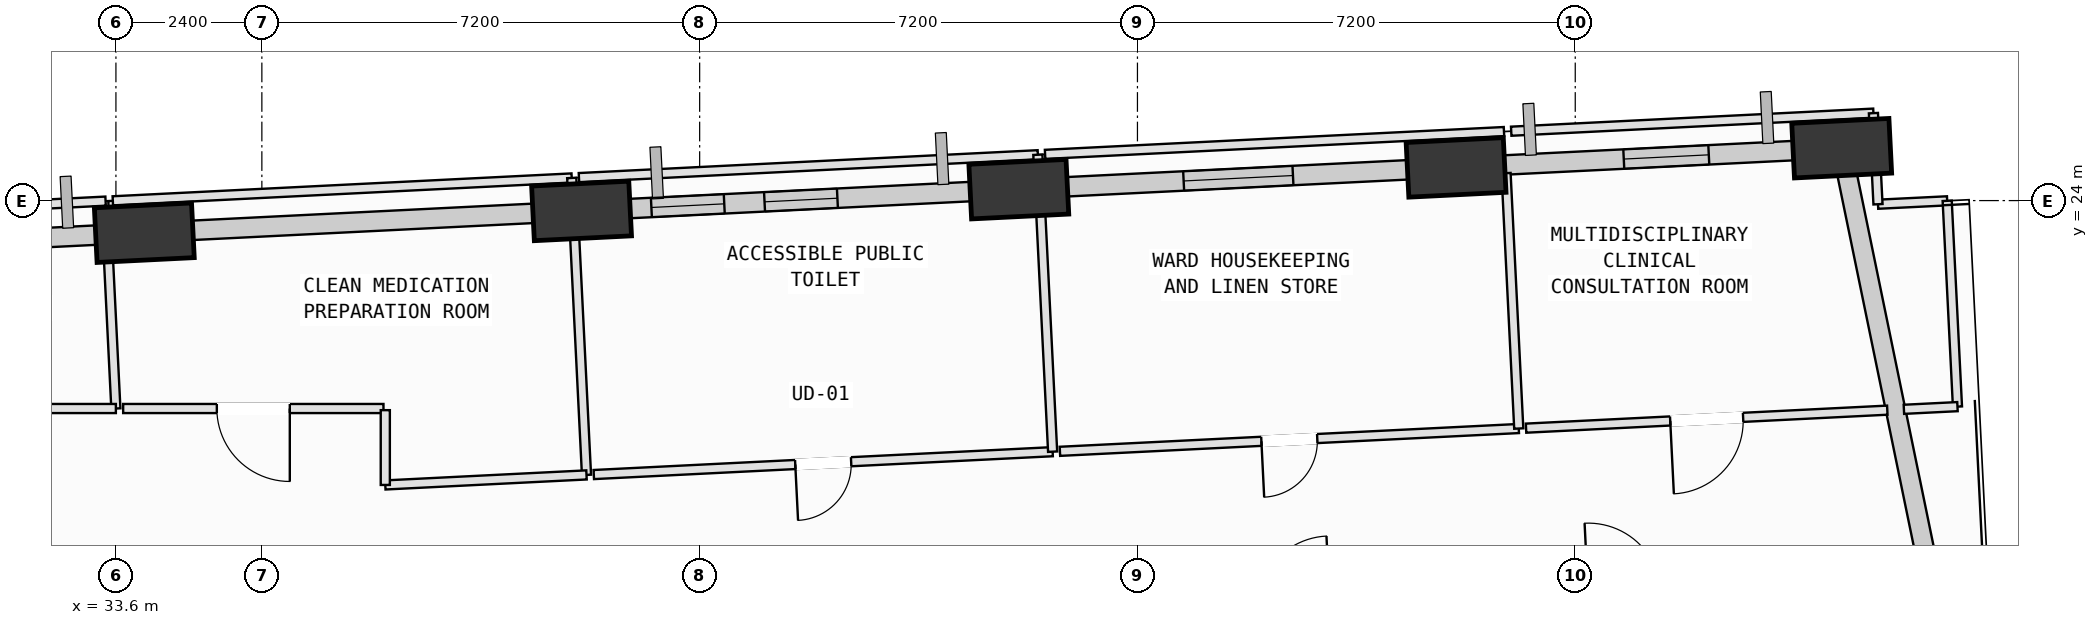
"""IFC4 building model, lengths in metres.
Left out: names, types, materials, properties, quantities, classifications, styles, units other than length and angle.
Written with IfcOpenShell. Run it as: python <this file> out.ifc"""

import sys

from ifc_helpers import new_model, si_unit, direction, frame, frame_2d, origin, origin_2d, place, context, subcontext, project, spatial, rectangle, extrude, element, fill, save


model = new_model("IFC4")
c1 = context("Model", 3, precision=1e-05, world=origin(), true_north=direction((0.0, 1.0)))
c2 = subcontext(c1, "Body", "Model", "MODEL_VIEW")
j1 = project(units=[si_unit("LENGTHUNIT", "METRE"), si_unit("PLANEANGLEUNIT", "RADIAN")], contexts=[c1])
p1 = place(None, origin())
s1 = spatial("IfcSite", under=j1, at=p1, CompositionType="ELEMENT")
p2 = place(p1, origin())
s2 = spatial("IfcBuilding", under=s1, at=p2, CompositionType="ELEMENT")
p3 = place(p2, frame((0.0, 0.0, 35.0)))
s3 = spatial("IfcBuildingStorey", under=s2, at=p3, CompositionType="ELEMENT", Elevation=35.0)
p4 = place(p3, frame((61.982, 24.862, 0.002), z_axis=(-0.001274054745, 0.116788351669, 0.993156008741), x_axis=(-0.998165031682, -0.060273092584, 0.00580722282)))
e1 = element("IfcColumn", 1, at=p4, inside=s3, PredefinedType="COLUMN", context=c2, shape_type="SweptSolid", body=[
    extrude(rectangle(XDim=1.6, YDim=0.9, at=origin_2d()), origin(), (0.0, 0.0, 1.0), 4.024),
])
p5 = place(p3, frame((55.64, 24.546, 0.002), z_axis=(0.000304169263, 0.091007443375, 0.995850165804), x_axis=(-0.998923039729, -0.046176668444, 0.00452504039)))
e2 = element("IfcColumn", 2, at=p5, inside=s3, PredefinedType="COLUMN", context=c2, shape_type="SweptSolid", body=[
    extrude(rectangle(XDim=1.6, YDim=0.9, at=origin_2d()), origin(), (0.0, 0.0, 1.0), 4.013),
])
p6 = place(p3, frame((48.449, 24.188, 0.002), z_axis=(0.002073047008, 0.061398774634, 0.998111162621), x_axis=(-0.999868976749, -0.01589650689, 0.003054571023)))
e3 = element("IfcColumn", 3, at=p6, inside=s3, PredefinedType="COLUMN", context=c2, shape_type="SweptSolid", body=[
    extrude(rectangle(XDim=1.6, YDim=0.9, at=origin_2d()), origin(), (0.0, 0.0, 1.0), 4.004),
])
p7 = place(p3, frame((41.258, 23.83, 0.002), z_axis=(0.003724424228, 0.031749190144, 0.999488928197), x_axis=(-0.997751228321, 0.067007164318, 0.001589437965)))
e4 = element("IfcColumn", 4, at=p7, inside=s3, PredefinedType="COLUMN", context=c2, shape_type="SweptSolid", body=[
    extrude(rectangle(XDim=1.6, YDim=0.9, at=origin_2d()), origin(), (0.0, 0.0, 1.0), 3.999),
])
p8 = place(p3, frame((34.067, 23.472, 0.002), z_axis=(0.00549776835, 0.00195476208, 0.999982976579), x_axis=(-0.381442714794, 0.924392433526, 0.000290121348)))
e5 = element("IfcColumn", 5, at=p8, inside=s3, PredefinedType="COLUMN", context=c2, shape_type="SweptSolid", body=[
    extrude(rectangle(XDim=1.6, YDim=0.9, at=origin_2d()), origin(), (0.0, 0.0, 1.0), 3.997),
])
p9 = place(p3, frame((62.058, 24.494, 0.0), z_axis=(0.0, 0.0, 1.0), x_axis=(0.201776077259, -0.979431679417, 0.0)))
e6 = element("IfcWall", 6, at=p9, inside=s3, PredefinedType="SOLIDWALL", context=c2, shape_type="SweptSolid", body=[
    extrude(rectangle(XDim=8.614, YDim=0.32, at=frame_2d((4.307, 0.0))), origin(), (0.0, 0.0, 1.0), 3.165),
])
p10 = place(p3, frame((56.229, 24.575, 0.0), z_axis=(0.0, 0.0, 1.0), x_axis=(0.998762835783, 0.049727234574, 0.0)))
e7 = element("IfcWall", 7, at=p10, inside=s3, PredefinedType="SOLIDWALL", context=c2, shape_type="SweptSolid", body=[
    extrude(rectangle(XDim=5.209, YDim=0.32, at=frame_2d((2.604, 0.0))), origin(), (0.0, 0.0, 1.0), 3.165),
])
p11 = place(p10, frame((2.172, 0.0, 0.75)))
e8 = element("IfcOpeningElement", 8, at=p11, cuts=e7, PredefinedType="OPENING", context=c2, shape_type="SweptSolid", body=[
    extrude(rectangle(XDim=1.4, YDim=1.85, at=frame_2d((0.7, 0.925))), frame((0.0, 0.17, 0.0), z_axis=(0.0, -1.0, 0.0), x_axis=(1.0, 0.0, 0.0)), (0.0, 0.0, 1.0), 0.34),
])
p12 = place(p3, frame((49.054, 24.218, 0.0), z_axis=(0.0, 0.0, 1.0), x_axis=(0.998764939735, 0.049684959063, 0.0)))
e9 = element("IfcWall", 9, at=p12, inside=s3, PredefinedType="SOLIDWALL", context=c2, shape_type="SweptSolid", body=[
    extrude(rectangle(XDim=6.024, YDim=0.32, at=frame_2d((3.012, 0.0))), origin(), (0.0, 0.0, 1.0), 3.165),
])
p13 = place(p12, frame((2.109, 0.0, 0.75)))
e10 = element("IfcOpeningElement", 10, at=p13, cuts=e9, PredefinedType="OPENING", context=c2, shape_type="SweptSolid", body=[
    extrude(rectangle(XDim=1.8, YDim=2.05, at=frame_2d((0.9, 1.025))), frame((0.0, 0.17, 0.0), z_axis=(0.0, -1.0, 0.0), x_axis=(1.0, 0.0, 0.0)), (0.0, 0.0, 1.0), 0.34),
])
p14 = place(p3, frame((41.872, 23.86, 0.0), z_axis=(0.0, 0.0, 1.0), x_axis=(0.998762870305, 0.049726541212, 0.0)))
e11 = element("IfcWall", 11, at=p14, inside=s3, PredefinedType="SOLIDWALL", context=c2, shape_type="SweptSolid", body=[
    extrude(rectangle(XDim=6.0, YDim=0.32, at=frame_2d((3.0, 0.0))), origin(), (0.0, 0.0, 1.0), 3.165),
])
p15 = place(p14, frame((2.398, 0.0, 0.75)))
e12 = element("IfcOpeningElement", 12, at=p15, cuts=e11, PredefinedType="OPENING", context=c2, shape_type="SweptSolid", body=[
    extrude(rectangle(XDim=1.2, YDim=1.75, at=frame_2d((0.6, 0.875))), frame((0.0, 0.17, 0.0), z_axis=(0.0, -1.0, 0.0), x_axis=(1.0, 0.0, 0.0)), (0.0, 0.0, 1.0), 0.34),
])
p16 = place(p14, frame((0.535, 0.0, 0.75)))
e13 = element("IfcOpeningElement", 13, at=p16, cuts=e11, PredefinedType="OPENING", context=c2, shape_type="SweptSolid", body=[
    extrude(rectangle(XDim=1.2, YDim=1.75, at=frame_2d((0.6, 0.875))), frame((0.0, 0.17, 0.0), z_axis=(0.0, -1.0, 0.0), x_axis=(1.0, 0.0, 0.0)), (0.0, 0.0, 1.0), 0.34),
])
p17 = place(p3, frame((34.685, 23.502, 0.0), z_axis=(0.0, 0.0, 1.0), x_axis=(0.99876177808, 0.049748473819, 0.0)))
e14 = element("IfcWall", 14, at=p17, inside=s3, PredefinedType="SOLIDWALL", context=c2, shape_type="SweptSolid", body=[
    extrude(rectangle(XDim=5.987, YDim=0.32, at=frame_2d((2.994, 0.0))), origin(), (0.0, 0.0, 1.0), 3.165),
])
p18 = place(p3, frame((27.742, 23.157, 0.0), z_axis=(0.0, 0.0, 1.0), x_axis=(0.998763564374, 0.049712598789, 0.0)))
e15 = element("IfcWall", 15, at=p18, inside=s3, PredefinedType="SOLIDWALL", context=c2, shape_type="SweptSolid", body=[
    extrude(rectangle(XDim=5.736, YDim=0.32, at=frame_2d((2.868, 0.0))), origin(), (0.0, 0.0, 1.0), 3.165),
])
p19 = place(p18, frame((1.757, 0.0, 0.75)))
e16 = element("IfcOpeningElement", 16, at=p19, cuts=e15, PredefinedType="OPENING", context=c2, shape_type="SweptSolid", body=[
    extrude(rectangle(XDim=2.0, YDim=1.95, at=frame_2d((1.0, 0.975))), frame((0.0, 0.17, 0.0), z_axis=(0.0, -1.0, 0.0), x_axis=(1.0, 0.0, 0.0)), (0.0, 0.0, 1.0), 0.34),
])
p20 = place(p3, frame((27.647, 23.703, 0.0), z_axis=(0.0, 0.0, 1.0), x_axis=(0.998761470129, 0.049754655919, 0.0)))
e17 = element("IfcWall", 17, at=p20, inside=s3, PredefinedType="PARTITIONING", context=c2, shape_type="SweptSolid", body=[
    extrude(rectangle(XDim=5.79, YDim=0.15, at=frame_2d((2.895, 0.0))), origin(), (0.0, 0.0, 1.0), 3.78),
])
p21 = place(p3, frame((33.464, 23.306, 0.0), z_axis=(0.0, 0.0, 1.0), x_axis=(0.049469138908, -0.998775652635, 0.0)))
e18 = element("IfcWall", 18, at=p21, inside=s3, PredefinedType="PARTITIONING", context=c2, shape_type="SweptSolid", body=[
    extrude(rectangle(XDim=2.729, YDim=0.15, at=frame_2d((1.365, 0.0))), origin(), (0.0, 0.0, 1.0), 3.78),
])
p22 = place(p3, frame((33.599, 20.58, 0.0), z_axis=(0.0, 0.0, 1.0), x_axis=(-1.0, 0.0, 0.0)))
e19 = element("IfcWall", 19, at=p22, inside=s3, PredefinedType="PARTITIONING", context=c2, shape_type="SweptSolid", body=[
    extrude(rectangle(XDim=7.565, YDim=0.15, at=frame_2d((3.783, 0.0))), origin(), (0.0, 0.0, 1.0), 3.78),
])
p23 = place(p22, frame((3.183, 0.0, 0.0)))
e20 = element("IfcOpeningElement", 20, at=p23, cuts=e19, PredefinedType="OPENING", context=c2, shape_type="SweptSolid", body=[
    extrude(rectangle(XDim=1.2, YDim=2.15, at=frame_2d((0.6, 1.075))), frame((0.0, 0.085, 0.0), z_axis=(0.0, -1.0, 0.0), x_axis=(1.0, 0.0, 0.0)), (0.0, 0.0, 1.0), 0.17),
])
p24 = place(p3, frame((38.0, 20.58, 0.0), z_axis=(0.0, 0.0, 1.0), x_axis=(-1.0, 0.0, 0.0)))
e21 = element("IfcWall", 21, at=p24, inside=s3, PredefinedType="PARTITIONING", context=c2, shape_type="SweptSolid", body=[
    extrude(rectangle(XDim=4.281, YDim=0.15, at=frame_2d((2.141, 0.0))), origin(), (0.0, 0.0, 1.0), 3.365),
])
p25 = place(p24, frame((1.541, 0.0, 0.0)))
e22 = element("IfcOpeningElement", 22, at=p25, cuts=e21, PredefinedType="OPENING", context=c2, shape_type="SweptSolid", body=[
    extrude(rectangle(XDim=1.2, YDim=2.15, at=frame_2d((0.6, 1.075))), frame((0.0, 0.085, 0.0), z_axis=(0.0, -1.0, 0.0), x_axis=(1.0, 0.0, 0.0)), (0.0, 0.0, 1.0), 0.17),
])
p26 = place(p3, frame((33.572, 23.531, 0.0), z_axis=(0.0, 0.0, 1.0), x_axis=(-0.049283869976, 0.998784811739, 0.0)))
e23 = element("IfcWall", 23, at=p26, inside=s3, PredefinedType="PARTITIONING", context=c2, shape_type="SweptSolid", body=[
    extrude(rectangle(XDim=0.466, YDim=0.15, at=frame_2d((0.233, 0.0))), origin(), (0.0, 0.0, 1.0), 3.78),
])
p27 = place(p3, frame((33.549, 23.996, 0.0), z_axis=(0.0, 0.0, 1.0), x_axis=(0.998761346761, 0.049757132311, 0.0)))
e24 = element("IfcWall", 24, at=p27, inside=s3, PredefinedType="PARTITIONING", context=c2, shape_type="SweptSolid", body=[
    extrude(rectangle(XDim=7.556, YDim=0.15, at=frame_2d((3.778, 0.0))), origin(), (0.0, 0.0, 1.0), 3.78),
])
p28 = place(p3, frame((41.096, 24.372, 0.0), z_axis=(0.0, 0.0, 1.0), x_axis=(0.04972596089, -0.998762899198, 0.0)))
e25 = element("IfcWall", 25, at=p28, inside=s3, PredefinedType="PARTITIONING", context=c2, shape_type="SweptSolid", body=[
    extrude(rectangle(XDim=4.89, YDim=0.15, at=frame_2d((2.445, 0.0))), origin(), (0.0, 0.0, 1.0), 3.78),
])
p29 = place(p3, frame((41.339, 19.488, 0.0), z_axis=(0.0, 0.0, 1.0), x_axis=(-0.998758578868, -0.049812660419, 0.0)))
e26 = element("IfcWall", 26, at=p29, inside=s3, PredefinedType="PARTITIONING", context=c2, shape_type="SweptSolid", body=[
    extrude(rectangle(XDim=3.313, YDim=0.15, at=frame_2d((1.657, 0.0))), origin(), (0.0, 0.0, 1.0), 3.78),
])
p30 = place(p3, frame((38.03, 19.323, 0.0), z_axis=(0.0, 0.0, 1.0), x_axis=(0.0, 1.0, 0.0)))
e27 = element("IfcWall", 27, at=p30, inside=s3, PredefinedType="PARTITIONING", context=c2, shape_type="SweptSolid", body=[
    extrude(rectangle(XDim=1.23, YDim=0.15, at=frame_2d((0.615, 0.0))), origin(), (0.0, 0.0, 1.0), 3.78),
])
p31 = place(p3, frame((49.005, 19.87, 0.0), z_axis=(0.0, 0.0, 1.0), x_axis=(-0.998759420147, -0.049795789648, 0.0)))
e28 = element("IfcWall", 28, at=p31, inside=s3, PredefinedType="PARTITIONING", context=c2, shape_type="SweptSolid", body=[
    extrude(rectangle(XDim=7.555, YDim=0.15, at=frame_2d((3.778, 0.0))), origin(), (0.0, 0.0, 1.0), 3.78),
])
p32 = place(p31, frame((3.318, 0.0, 0.0)))
e29 = element("IfcOpeningElement", 29, at=p32, cuts=e28, PredefinedType="OPENING", context=c2, shape_type="SweptSolid", body=[
    extrude(rectangle(XDim=0.92, YDim=2.1, at=frame_2d((0.46, 1.05))), frame((0.0, 0.085, 0.0), z_axis=(0.0, -1.0, 0.0), x_axis=(1.0, 0.0, 0.0)), (0.0, 0.0, 1.0), 0.17),
])
p33 = place(p3, frame((41.215, 24.378, 0.0), z_axis=(0.0, 0.0, 1.0), x_axis=(0.998761346761, 0.049757132311, 0.0)))
e30 = element("IfcWall", 30, at=p33, inside=s3, PredefinedType="PARTITIONING", context=c2, shape_type="SweptSolid", body=[
    extrude(rectangle(XDim=7.556, YDim=0.15, at=frame_2d((3.778, 0.0))), origin(), (0.0, 0.0, 1.0), 3.165),
])
p34 = place(p3, frame((48.762, 24.754, 0.0), z_axis=(0.0, 0.0, 1.0), x_axis=(0.049678635673, -0.99876525428, 0.0)))
e31 = element("IfcWall", 31, at=p34, inside=s3, PredefinedType="PARTITIONING", context=c2, shape_type="SweptSolid", body=[
    extrude(rectangle(XDim=4.89, YDim=0.15, at=frame_2d((2.445, 0.0))), origin(), (0.0, 0.0, 1.0), 3.78),
])
p35 = place(p3, frame((56.671, 20.251, 0.0), z_axis=(0.0, 0.0, 1.0), x_axis=(-0.998767442719, -0.049634618611, 0.0)))
e32 = element("IfcWall", 32, at=p35, inside=s3, PredefinedType="PARTITIONING", context=c2, shape_type="SweptSolid", body=[
    extrude(rectangle(XDim=7.555, YDim=0.15, at=frame_2d((3.778, 0.0))), origin(), (0.0, 0.0, 1.0), 3.78),
])
p36 = place(p35, frame((3.318, 0.0, 0.0)))
e33 = element("IfcOpeningElement", 33, at=p36, cuts=e32, PredefinedType="OPENING", context=c2, shape_type="SweptSolid", body=[
    extrude(rectangle(XDim=0.92, YDim=2.1, at=frame_2d((0.46, 1.05))), frame((0.0, 0.085, 0.0), z_axis=(0.0, -1.0, 0.0), x_axis=(1.0, 0.0, 0.0)), (0.0, 0.0, 1.0), 0.17),
])
p37 = place(p3, frame((48.881, 24.76, 0.0), z_axis=(0.0, 0.0, 1.0), x_axis=(0.998767761094, 0.049628211731, 0.0)))
e34 = element("IfcWall", 34, at=p37, inside=s3, PredefinedType="PARTITIONING", context=c2, shape_type="SweptSolid", body=[
    extrude(rectangle(XDim=7.556, YDim=0.15, at=frame_2d((3.778, 0.0))), origin(), (0.0, 0.0, 1.0), 3.165),
])
p38 = place(p3, frame((56.462, 24.451, 0.0), z_axis=(0.0, 0.0, 1.0), x_axis=(0.04969727744, -0.998764326863, 0.0)))
e35 = element("IfcWall", 35, at=p38, inside=s3, PredefinedType="PARTITIONING", context=c2, shape_type="SweptSolid", body=[
    extrude(rectangle(XDim=4.205, YDim=0.15, at=frame_2d((2.103, 0.0))), origin(), (0.0, 0.0, 1.0), 3.78),
])
p39 = place(p3, frame((62.579, 23.94, 0.0), z_axis=(0.0, 0.0, 1.0), x_axis=(0.998784723145, 0.049285665377, 0.0)))
e36 = element("IfcWall", 36, at=p39, inside=s3, PredefinedType="PARTITIONING", context=c2, shape_type="SweptSolid", body=[
    extrude(rectangle(XDim=1.139, YDim=0.15, at=frame_2d((0.57, 0.0))), origin(), (0.0, 0.0, 1.0), 3.78),
])
p40 = place(p3, frame((63.717, 23.996, 0.0), z_axis=(0.0, 0.0, 1.0), x_axis=(0.0498477983, -0.998756825761, 0.0)))
e37 = element("IfcWall", 37, at=p40, inside=s3, PredefinedType="PARTITIONING", context=c2, shape_type="SweptSolid", body=[
    extrude(rectangle(XDim=3.389, YDim=0.15, at=frame_2d((1.695, 0.0))), origin(), (0.0, 0.0, 1.0), 3.78),
])
p41 = place(p3, frame((63.886, 20.611, 0.0), z_axis=(0.0, 0.0, 1.0), x_axis=(-0.998744736042, -0.05008944229, 0.0)))
e38 = element("IfcWall", 38, at=p41, inside=s3, PredefinedType="PARTITIONING", context=c2, shape_type="SweptSolid", body=[
    extrude(rectangle(XDim=0.882, YDim=0.15, at=frame_2d((0.441, 0.0))), origin(), (0.0, 0.0, 1.0), 3.78),
])
p42 = place(p3, frame((62.732, 20.553, 0.0), z_axis=(0.0, 0.0, 1.0), x_axis=(-0.998761941601, -0.049745190812, 0.0)))
e39 = element("IfcWall", 39, at=p42, inside=s3, PredefinedType="PARTITIONING", context=c2, shape_type="SweptSolid", body=[
    extrude(rectangle(XDim=5.948, YDim=0.15, at=frame_2d((2.974, 0.0))), origin(), (0.0, 0.0, 1.0), 3.78),
])
p43 = place(p42, frame((2.374, 0.0, 0.0)))
e40 = element("IfcOpeningElement", 40, at=p43, cuts=e39, PredefinedType="OPENING", context=c2, shape_type="SweptSolid", body=[
    extrude(rectangle(XDim=1.2, YDim=2.15, at=frame_2d((0.6, 1.075))), frame((0.0, 0.085, 0.0), z_axis=(0.0, -1.0, 0.0), x_axis=(1.0, 0.0, 0.0)), (0.0, 0.0, 1.0), 0.17),
])
p44 = place(p3, frame((56.547, 25.141, 0.0), z_axis=(0.0, 0.0, 1.0), x_axis=(0.998760390254, 0.049776328315, 0.0)))
e41 = element("IfcWall", 41, at=p44, inside=s3, PredefinedType="PARTITIONING", context=c2, shape_type="SweptSolid", body=[
    extrude(rectangle(XDim=5.964, YDim=0.15, at=frame_2d((2.982, 0.0))), origin(), (0.0, 0.0, 1.0), 3.165),
])
p45 = place(p3, frame((62.504, 25.438, 0.0), z_axis=(0.0, 0.0, 1.0), x_axis=(0.050132450143, -0.998742578167, 0.0)))
e42 = element("IfcWall", 42, at=p45, inside=s3, PredefinedType="PARTITIONING", context=c2, shape_type="SweptSolid", body=[
    extrude(rectangle(XDim=1.5, YDim=0.15, at=frame_2d((0.75, 0.0))), origin(), (0.0, 0.0, 1.0), 3.165),
])
p46 = place(p11, origin())
e43 = element("IfcWindow", 43, at=p46, inside=s3, PartitioningType="SINGLE_PANEL", PredefinedType="WINDOW", context=c2, shape_type="SweptSolid", body=[
    extrude(rectangle(XDim=1.4, YDim=1.85, at=frame_2d((0.7, 0.925))), frame((0.0, 0.03, 0.0), z_axis=(0.0, -1.0, 0.0), x_axis=(1.0, 0.0, 0.0)), (0.0, 0.0, 1.0), 0.06),
])
fill(e8, e43)
p47 = place(p13, origin())
e44 = element("IfcWindow", 44, at=p47, inside=s3, PartitioningType="SINGLE_PANEL", PredefinedType="WINDOW", context=c2, shape_type="SweptSolid", body=[
    extrude(rectangle(XDim=1.8, YDim=2.05, at=frame_2d((0.9, 1.025))), frame((0.0, 0.03, 0.0), z_axis=(0.0, -1.0, 0.0), x_axis=(1.0, 0.0, 0.0)), (0.0, 0.0, 1.0), 0.06),
])
fill(e10, e44)
p48 = place(p15, origin())
e45 = element("IfcWindow", 45, at=p48, inside=s3, PartitioningType="SINGLE_PANEL", PredefinedType="WINDOW", context=c2, shape_type="SweptSolid", body=[
    extrude(rectangle(XDim=1.2, YDim=1.75, at=frame_2d((0.6, 0.875))), frame((0.0, 0.03, 0.0), z_axis=(0.0, -1.0, 0.0), x_axis=(1.0, 0.0, 0.0)), (0.0, 0.0, 1.0), 0.06),
])
fill(e12, e45)
p49 = place(p16, origin())
e46 = element("IfcWindow", 46, at=p49, inside=s3, PartitioningType="SINGLE_PANEL", PredefinedType="WINDOW", context=c2, shape_type="SweptSolid", body=[
    extrude(rectangle(XDim=1.2, YDim=1.75, at=frame_2d((0.6, 0.875))), frame((0.0, 0.03, 0.0), z_axis=(0.0, -1.0, 0.0), x_axis=(1.0, 0.0, 0.0)), (0.0, 0.0, 1.0), 0.06),
])
fill(e13, e46)
p50 = place(p25, origin())
e47 = element("IfcDoor", 47, at=p50, inside=s3, OperationType="SINGLE_SWING_LEFT", PredefinedType="DOOR", context=c2, shape_type="SweptSolid", body=[
    extrude(rectangle(XDim=1.2, YDim=2.15, at=frame_2d((0.6, 1.075))), frame((0.0, 0.025, 0.0), z_axis=(0.0, -1.0, 0.0), x_axis=(1.0, 0.0, 0.0)), (0.0, 0.0, 1.0), 0.05),
])
fill(e22, e47)
p51 = place(p32, origin())
e48 = element("IfcDoor", 48, at=p51, inside=s3, OperationType="SINGLE_SWING_RIGHT", PredefinedType="DOOR", context=c2, shape_type="SweptSolid", body=[
    extrude(rectangle(XDim=0.92, YDim=2.1, at=frame_2d((0.46, 1.05))), frame((0.0, 0.025, 0.0), z_axis=(0.0, -1.0, 0.0), x_axis=(1.0, 0.0, 0.0)), (0.0, 0.0, 1.0), 0.05),
])
fill(e29, e48)
p52 = place(p36, origin())
e49 = element("IfcDoor", 49, at=p52, inside=s3, OperationType="SINGLE_SWING_RIGHT", PredefinedType="DOOR", context=c2, shape_type="SweptSolid", body=[
    extrude(rectangle(XDim=0.92, YDim=2.1, at=frame_2d((0.46, 1.05))), frame((0.0, 0.025, 0.0), z_axis=(0.0, -1.0, 0.0), x_axis=(1.0, 0.0, 0.0)), (0.0, 0.0, 1.0), 0.05),
])
fill(e33, e49)
p53 = place(p43, origin())
e50 = element("IfcDoor", 50, at=p53, inside=s3, OperationType="SINGLE_SWING_RIGHT", PredefinedType="DOOR", context=c2, shape_type="SweptSolid", body=[
    extrude(rectangle(XDim=1.2, YDim=2.15, at=frame_2d((0.6, 1.075))), frame((0.0, 0.025, 0.0), z_axis=(0.0, -1.0, 0.0), x_axis=(1.0, 0.0, 0.0)), (0.0, 0.0, 1.0), 0.05),
])
fill(e40, e50)
save(model, sys.argv[1])
